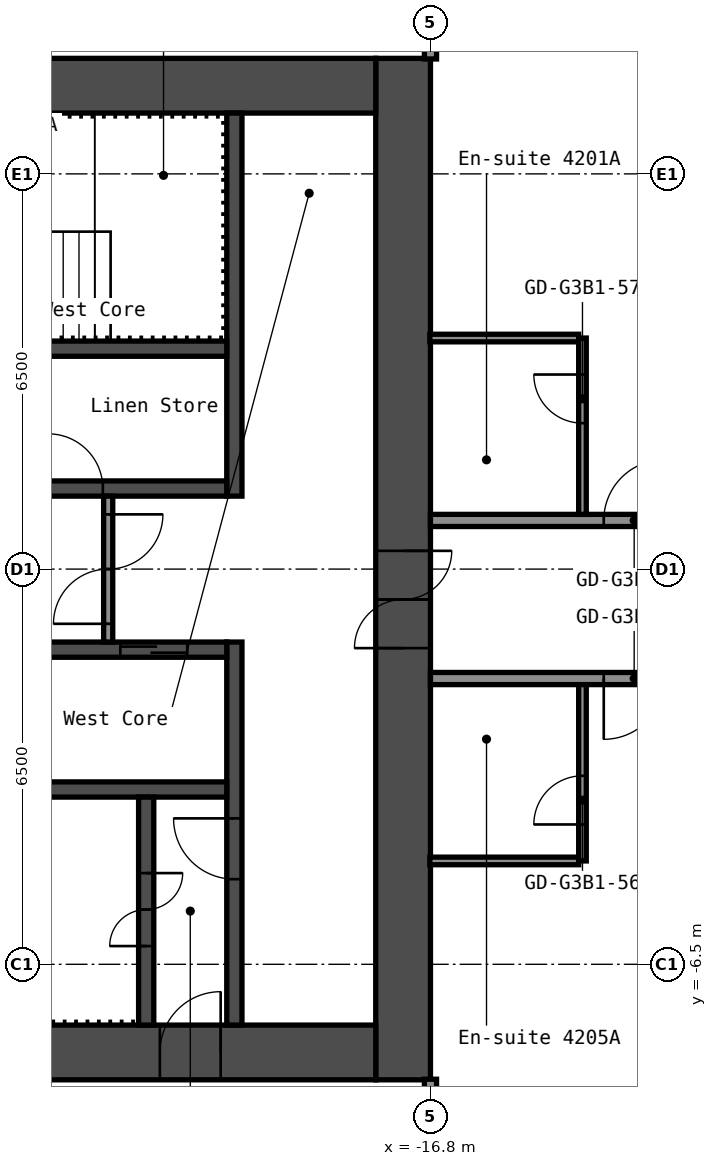
"""IFC4 building model, lengths in metres.
Left out: names, types, materials, properties, quantities, classifications, styles, units other than length and angle.
Written with IfcOpenShell. Run it as: python <this file> out.ifc"""

import sys

from ifc_helpers import new_model, si_unit, direction, frame, frame_2d, origin, place, context, subcontext, project, spatial, rectangle, extrude, element, fill, save


model = new_model("IFC4")
c1 = context("Model", 3, precision=1e-05, world=origin(), true_north=direction((0.0, 1.0)))
c2 = subcontext(c1, "Body", "Model", "MODEL_VIEW")
j1 = project(units=[si_unit("LENGTHUNIT", "METRE"), si_unit("PLANEANGLEUNIT", "RADIAN")], contexts=[c1])
p1 = place(None, origin())
s1 = spatial("IfcSite", under=j1, at=p1, CompositionType="ELEMENT")
p2 = place(p1, origin())
s2 = spatial("IfcBuilding", under=s1, at=p2, CompositionType="ELEMENT")
p3 = place(p2, frame((0.0, 0.0, 150.2)))
s3 = spatial("IfcBuildingStorey", under=s2, at=p3, CompositionType="ELEMENT", Elevation=150.2)
p4 = place(p3, frame((-17.25, -8.4, 0.0), z_axis=(0.0, 0.0, 1.0), x_axis=(0.0, 1.0, 0.0)))
e1 = element("IfcWall", 1, at=p4, inside=s3, PredefinedType="SHEAR", context=c2, shape_type="SweptSolid", body=[
    extrude(rectangle(XDim=16.8, YDim=0.9, at=frame_2d((8.4, 0.0))), origin(), (0.0, 0.0, 1.0), 2.75),
])
p5 = place(p4, frame((7.1, 0.0, 0.0)))
e2 = element("IfcOpeningElement", 2, at=p5, cuts=e1, PredefinedType="OPENING", context=c2, shape_type="SweptSolid", body=[
    extrude(rectangle(XDim=1.6, YDim=2.1, at=frame_2d((0.8, 1.05))), frame((0.0, 0.46, 0.0), z_axis=(0.0, -1.0, 0.0), x_axis=(1.0, 0.0, 0.0)), (0.0, 0.0, 1.0), 0.92),
])
p6 = place(p3, frame((-32.7, 7.95, 0.0), z_axis=(0.0, 0.0, 1.0), x_axis=(1.0, 0.0, 0.0)))
e3 = element("IfcWall", 3, at=p6, inside=s3, PredefinedType="SHEAR", context=c2, shape_type="SweptSolid", body=[
    extrude(rectangle(XDim=15.0, YDim=0.9, at=frame_2d((7.5, 0.0))), origin(), (0.0, 0.0, 1.0), 2.75),
])
p7 = place(p6, frame((3.4, 0.0, 0.0)))
e4 = element("IfcOpeningElement", 4, at=p7, cuts=e3, PredefinedType="OPENING", context=c2, shape_type="SweptSolid", body=[
    extrude(rectangle(XDim=1.2, YDim=2.1, at=frame_2d((0.6, 1.05))), frame((0.0, 0.46, 0.0), z_axis=(0.0, -1.0, 0.0), x_axis=(1.0, 0.0, 0.0)), (0.0, 0.0, 1.0), 0.92),
])
p8 = place(p6, frame((0.75, 0.0, 0.0)))
e5 = element("IfcOpeningElement", 5, at=p8, cuts=e3, PredefinedType="OPENING", context=c2, shape_type="SweptSolid", body=[
    extrude(rectangle(XDim=0.9, YDim=2.1, at=frame_2d((0.45, 1.05))), frame((0.0, 0.46, 0.0), z_axis=(0.0, -1.0, 0.0), x_axis=(1.0, 0.0, 0.0)), (0.0, 0.0, 1.0), 0.92),
])
p9 = place(p3, frame((-32.7, -7.95, 0.0), z_axis=(0.0, 0.0, 1.0), x_axis=(1.0, 0.0, 0.0)))
e6 = element("IfcWall", 6, at=p9, inside=s3, PredefinedType="SHEAR", context=c2, shape_type="SweptSolid", body=[
    extrude(rectangle(XDim=15.0, YDim=0.9, at=frame_2d((7.5, 0.0))), origin(), (0.0, 0.0, 1.0), 2.75),
])
p10 = place(p9, frame((11.45, 0.0, 0.0)))
e7 = element("IfcOpeningElement", 7, at=p10, cuts=e6, PredefinedType="OPENING", context=c2, shape_type="SweptSolid", body=[
    extrude(rectangle(XDim=1.0, YDim=2.1, at=frame_2d((0.5, 1.05))), frame((0.0, 0.46, 0.0), z_axis=(0.0, -1.0, 0.0), x_axis=(1.0, 0.0, 0.0)), (0.0, 0.0, 1.0), 0.92),
])
p11 = place(p3, frame((-20.025, 1.2, 0.0), z_axis=(0.0, 0.0, 1.0), x_axis=(0.0, 1.0, 0.0)))
e8 = element("IfcWall", 8, at=p11, inside=s3, PredefinedType="SHEAR", context=c2, shape_type="SweptSolid", body=[
    extrude(rectangle(XDim=6.3, YDim=0.25, at=frame_2d((3.15, 0.0))), origin(), (0.0, 0.0, 1.0), 2.75),
])
p12 = place(p3, frame((-20.025, -7.5, 0.0), z_axis=(0.0, 0.0, 1.0), x_axis=(0.0, 1.0, 0.0)))
e9 = element("IfcWall", 9, at=p12, inside=s3, PredefinedType="SHEAR", context=c2, shape_type="SweptSolid", body=[
    extrude(rectangle(XDim=6.3, YDim=0.25, at=frame_2d((3.15, 0.0))), origin(), (0.0, 0.0, 1.0), 2.75),
])
p13 = place(p12, frame((2.4, 0.0, 0.0)))
e10 = element("IfcOpeningElement", 10, at=p13, cuts=e9, PredefinedType="OPENING", context=c2, shape_type="SweptSolid", body=[
    extrude(rectangle(XDim=1.0, YDim=2.1, at=frame_2d((0.5, 1.05))), frame((0.0, 0.135, 0.0), z_axis=(0.0, -1.0, 0.0), x_axis=(1.0, 0.0, 0.0)), (0.0, 0.0, 1.0), 0.27),
])
p14 = place(p3, frame((-27.65, 1.325, 0.0), z_axis=(0.0, 0.0, 1.0), x_axis=(1.0, 0.0, 0.0)))
e11 = element("IfcWall", 11, at=p14, inside=s3, PredefinedType="SHEAR", context=c2, shape_type="SweptSolid", body=[
    extrude(rectangle(XDim=7.5, YDim=0.25, at=frame_2d((3.75, 0.0))), origin(), (0.0, 0.0, 1.0), 2.75),
])
p15 = place(p14, frame((4.562, 0.0, 0.0)))
e12 = element("IfcOpeningElement", 12, at=p15, cuts=e11, PredefinedType="OPENING", context=c2, shape_type="SweptSolid", body=[
    extrude(rectangle(XDim=0.9, YDim=2.1, at=frame_2d((0.45, 1.05))), frame((0.0, 0.135, 0.0), z_axis=(0.0, -1.0, 0.0), x_axis=(1.0, 0.0, 0.0)), (0.0, 0.0, 1.0), 0.27),
])
p16 = place(p14, frame((0.863, 0.0, 0.0)))
e13 = element("IfcOpeningElement", 13, at=p16, cuts=e11, PredefinedType="OPENING", context=c2, shape_type="SweptSolid", body=[
    extrude(rectangle(XDim=0.9, YDim=2.1, at=frame_2d((0.45, 1.05))), frame((0.0, 0.135, 0.0), z_axis=(0.0, -1.0, 0.0), x_axis=(1.0, 0.0, 0.0)), (0.0, 0.0, 1.0), 0.27),
])
p17 = place(p3, frame((-27.65, 3.625, 0.0), z_axis=(0.0, 0.0, 1.0), x_axis=(1.0, 0.0, 0.0)))
e14 = element("IfcWall", 14, at=p17, inside=s3, PredefinedType="SHEAR", context=c2, shape_type="SweptSolid", body=[
    extrude(rectangle(XDim=7.5, YDim=0.25, at=frame_2d((3.75, 0.0))), origin(), (0.0, 0.0, 1.0), 2.75),
])
p18 = place(p3, frame((-27.65, -1.325, 0.0), z_axis=(0.0, 0.0, 1.0), x_axis=(1.0, 0.0, 0.0)))
e15 = element("IfcWall", 15, at=p18, inside=s3, PredefinedType="SHEAR", context=c2, shape_type="SweptSolid", body=[
    extrude(rectangle(XDim=7.5, YDim=0.25, at=frame_2d((3.75, 0.0))), origin(), (0.0, 0.0, 1.0), 2.75),
])
p19 = place(p18, frame((5.75, 0.0, 0.0)))
e16 = element("IfcOpeningElement", 16, at=p19, cuts=e15, PredefinedType="OPENING", context=c2, shape_type="SweptSolid", body=[
    extrude(rectangle(XDim=1.1, YDim=2.1, at=frame_2d((0.55, 1.05))), frame((0.0, 0.135, 0.0), z_axis=(0.0, -1.0, 0.0), x_axis=(1.0, 0.0, 0.0)), (0.0, 0.0, 1.0), 0.27),
])
p20 = place(p18, frame((3.35, 0.0, 0.0)))
e17 = element("IfcOpeningElement", 17, at=p20, cuts=e15, PredefinedType="OPENING", context=c2, shape_type="SweptSolid", body=[
    extrude(rectangle(XDim=1.1, YDim=2.1, at=frame_2d((0.55, 1.05))), frame((0.0, 0.135, 0.0), z_axis=(0.0, -1.0, 0.0), x_axis=(1.0, 0.0, 0.0)), (0.0, 0.0, 1.0), 0.27),
])
p21 = place(p18, frame((0.95, 0.0, 0.0)))
e18 = element("IfcOpeningElement", 18, at=p21, cuts=e15, PredefinedType="OPENING", context=c2, shape_type="SweptSolid", body=[
    extrude(rectangle(XDim=1.1, YDim=2.1, at=frame_2d((0.55, 1.05))), frame((0.0, 0.135, 0.0), z_axis=(0.0, -1.0, 0.0), x_axis=(1.0, 0.0, 0.0)), (0.0, 0.0, 1.0), 0.27),
])
p22 = place(p3, frame((-27.65, -3.625, 0.0), z_axis=(0.0, 0.0, 1.0), x_axis=(1.0, 0.0, 0.0)))
e19 = element("IfcWall", 19, at=p22, inside=s3, PredefinedType="SHEAR", context=c2, shape_type="SweptSolid", body=[
    extrude(rectangle(XDim=7.5, YDim=0.25, at=frame_2d((3.75, 0.0))), origin(), (0.0, 0.0, 1.0), 2.75),
])
p23 = place(p3, frame((-21.475, -7.5, 0.0), z_axis=(0.0, 0.0, 1.0), x_axis=(0.0, 1.0, 0.0)))
e20 = element("IfcWall", 20, at=p23, inside=s3, PredefinedType="SHEAR", context=c2, shape_type="SweptSolid", body=[
    extrude(rectangle(XDim=3.75, YDim=0.25, at=frame_2d((1.875, 0.0))), origin(), (0.0, 0.0, 1.0), 2.75),
])
p24 = place(p23, frame((1.3, 0.0, 0.0)))
e21 = element("IfcOpeningElement", 21, at=p24, cuts=e20, PredefinedType="OPENING", context=c2, shape_type="SweptSolid", body=[
    extrude(rectangle(XDim=1.2, YDim=2.1, at=frame_2d((0.6, 1.05))), frame((0.0, 0.135, 0.0), z_axis=(0.0, -1.0, 0.0), x_axis=(1.0, 0.0, 0.0)), (0.0, 0.0, 1.0), 0.27),
])
p25 = place(p3, frame((-22.1, -1.2, 0.0), z_axis=(0.0, 0.0, 1.0), x_axis=(0.0, 1.0, 0.0)))
e22 = element("IfcWall", 22, at=p25, inside=s3, PredefinedType="PARTITIONING", context=c2, shape_type="SweptSolid", body=[
    extrude(rectangle(XDim=2.4, YDim=0.15, at=frame_2d((1.2, 0.0))), origin(), (0.0, 0.0, 1.0), 2.75),
])
p26 = place(p25, frame((0.3, 0.0, 0.0)))
e23 = element("IfcOpeningElement", 23, at=p26, cuts=e22, PredefinedType="OPENING", context=c2, shape_type="SweptSolid", body=[
    extrude(rectangle(XDim=1.8, YDim=2.1, at=frame_2d((0.9, 1.05))), frame((0.0, 0.085, 0.0), z_axis=(0.0, -1.0, 0.0), x_axis=(1.0, 0.0, 0.0)), (0.0, 0.0, 1.0), 0.17),
])
p27 = place(p3, frame((-16.81, -4.8, 0.0), z_axis=(0.0, 0.0, 1.0), x_axis=(1.0, 0.0, 0.0)))
e24 = element("IfcWall", 24, at=p27, inside=s3, PredefinedType="PARTITIONING", context=c2, shape_type="SweptSolid", body=[
    extrude(rectangle(XDim=2.448, YDim=0.125, at=frame_2d((1.224, 0.0))), origin(), (0.0, 0.0, 1.0), 2.75),
])
p28 = place(p3, frame((-16.8, -1.8, 0.0), z_axis=(0.0, 0.0, 1.0), x_axis=(1.0, 0.0, 0.0)))
e25 = element("IfcWall", 25, at=p28, inside=s3, PredefinedType="PARTITIONING", context=c2, shape_type="SweptSolid", body=[
    extrude(rectangle(XDim=33.6, YDim=0.2, at=frame_2d((16.8, 0.0))), origin(), (0.0, 0.0, 1.0), 2.75),
])
p29 = place(p28, frame((2.85, 0.0, 0.0)))
e26 = element("IfcOpeningElement", 26, at=p29, cuts=e25, PredefinedType="OPENING", context=c2, shape_type="SweptSolid", body=[
    extrude(rectangle(XDim=1.0, YDim=2.1, at=frame_2d((0.5, 1.05))), frame((0.0, 0.11, 0.0), z_axis=(0.0, -1.0, 0.0), x_axis=(1.0, 0.0, 0.0)), (0.0, 0.0, 1.0), 0.22),
])
p30 = place(p28, frame((4.55, 0.0, 0.0)))
e27 = element("IfcOpeningElement", 27, at=p30, cuts=e25, PredefinedType="OPENING", context=c2, shape_type="SweptSolid", body=[
    extrude(rectangle(XDim=1.0, YDim=2.1, at=frame_2d((0.5, 1.05))), frame((0.0, 0.11, 0.0), z_axis=(0.0, -1.0, 0.0), x_axis=(1.0, 0.0, 0.0)), (0.0, 0.0, 1.0), 0.22),
])
p31 = place(p28, frame((10.3, 0.0, 0.0)))
e28 = element("IfcOpeningElement", 28, at=p31, cuts=e25, PredefinedType="OPENING", context=c2, shape_type="SweptSolid", body=[
    extrude(rectangle(XDim=1.0, YDim=2.1, at=frame_2d((0.5, 1.05))), frame((0.0, 0.11, 0.0), z_axis=(0.0, -1.0, 0.0), x_axis=(1.0, 0.0, 0.0)), (0.0, 0.0, 1.0), 0.22),
])
p32 = place(p28, frame((20.5, 0.0, 0.0)))
e29 = element("IfcOpeningElement", 29, at=p32, cuts=e25, PredefinedType="OPENING", context=c2, shape_type="SweptSolid", body=[
    extrude(rectangle(XDim=1.0, YDim=2.1, at=frame_2d((0.5, 1.05))), frame((0.0, 0.11, 0.0), z_axis=(0.0, -1.0, 0.0), x_axis=(1.0, 0.0, 0.0)), (0.0, 0.0, 1.0), 0.22),
])
p33 = place(p28, frame((28.05, 0.0, 0.0)))
e30 = element("IfcOpeningElement", 30, at=p33, cuts=e25, PredefinedType="OPENING", context=c2, shape_type="SweptSolid", body=[
    extrude(rectangle(XDim=1.0, YDim=2.1, at=frame_2d((0.5, 1.05))), frame((0.0, 0.11, 0.0), z_axis=(0.0, -1.0, 0.0), x_axis=(1.0, 0.0, 0.0)), (0.0, 0.0, 1.0), 0.22),
])
p34 = place(p28, frame((29.75, 0.0, 0.0)))
e31 = element("IfcOpeningElement", 31, at=p34, cuts=e25, PredefinedType="OPENING", context=c2, shape_type="SweptSolid", body=[
    extrude(rectangle(XDim=1.0, YDim=2.1, at=frame_2d((0.5, 1.05))), frame((0.0, 0.11, 0.0), z_axis=(0.0, -1.0, 0.0), x_axis=(1.0, 0.0, 0.0)), (0.0, 0.0, 1.0), 0.22),
])
p35 = place(p3, frame((-16.8, 0.8, 0.0), z_axis=(0.0, 0.0, 1.0), x_axis=(1.0, 0.0, 0.0)))
e32 = element("IfcWall", 32, at=p35, inside=s3, PredefinedType="PARTITIONING", context=c2, shape_type="SweptSolid", body=[
    extrude(rectangle(XDim=33.6, YDim=0.2, at=frame_2d((16.8, 0.0))), origin(), (0.0, 0.0, 1.0), 2.75),
])
p36 = place(p35, frame((2.85, 0.0, 0.0)))
e33 = element("IfcOpeningElement", 33, at=p36, cuts=e32, PredefinedType="OPENING", context=c2, shape_type="SweptSolid", body=[
    extrude(rectangle(XDim=1.0, YDim=2.1, at=frame_2d((0.5, 1.05))), frame((0.0, 0.11, 0.0), z_axis=(0.0, -1.0, 0.0), x_axis=(1.0, 0.0, 0.0)), (0.0, 0.0, 1.0), 0.22),
])
p37 = place(p35, frame((4.55, 0.0, 0.0)))
e34 = element("IfcOpeningElement", 34, at=p37, cuts=e32, PredefinedType="OPENING", context=c2, shape_type="SweptSolid", body=[
    extrude(rectangle(XDim=1.0, YDim=2.1, at=frame_2d((0.5, 1.05))), frame((0.0, 0.11, 0.0), z_axis=(0.0, -1.0, 0.0), x_axis=(1.0, 0.0, 0.0)), (0.0, 0.0, 1.0), 0.22),
])
p38 = place(p35, frame((10.22, 0.0, 0.0)))
e35 = element("IfcOpeningElement", 35, at=p38, cuts=e32, PredefinedType="OPENING", context=c2, shape_type="SweptSolid", body=[
    extrude(rectangle(XDim=0.9, YDim=2.1, at=frame_2d((0.45, 1.05))), frame((0.0, 0.11, 0.0), z_axis=(0.0, -1.0, 0.0), x_axis=(1.0, 0.0, 0.0)), (0.0, 0.0, 1.0), 0.22),
])
p39 = place(p35, frame((14.42, 0.0, 0.0)))
e36 = element("IfcOpeningElement", 36, at=p39, cuts=e32, PredefinedType="OPENING", context=c2, shape_type="SweptSolid", body=[
    extrude(rectangle(XDim=0.9, YDim=2.1, at=frame_2d((0.45, 1.05))), frame((0.0, 0.11, 0.0), z_axis=(0.0, -1.0, 0.0), x_axis=(1.0, 0.0, 0.0)), (0.0, 0.0, 1.0), 0.22),
])
p40 = place(p35, frame((19.65, 0.0, 0.0)))
e37 = element("IfcOpeningElement", 37, at=p40, cuts=e32, PredefinedType="OPENING", context=c2, shape_type="SweptSolid", body=[
    extrude(rectangle(XDim=1.0, YDim=2.1, at=frame_2d((0.5, 1.05))), frame((0.0, 0.11, 0.0), z_axis=(0.0, -1.0, 0.0), x_axis=(1.0, 0.0, 0.0)), (0.0, 0.0, 1.0), 0.22),
])
p41 = place(p35, frame((21.35, 0.0, 0.0)))
e38 = element("IfcOpeningElement", 38, at=p41, cuts=e32, PredefinedType="OPENING", context=c2, shape_type="SweptSolid", body=[
    extrude(rectangle(XDim=1.0, YDim=2.1, at=frame_2d((0.5, 1.05))), frame((0.0, 0.11, 0.0), z_axis=(0.0, -1.0, 0.0), x_axis=(1.0, 0.0, 0.0)), (0.0, 0.0, 1.0), 0.22),
])
p42 = place(p35, frame((28.05, 0.0, 0.0)))
e39 = element("IfcOpeningElement", 39, at=p42, cuts=e32, PredefinedType="OPENING", context=c2, shape_type="SweptSolid", body=[
    extrude(rectangle(XDim=1.0, YDim=2.1, at=frame_2d((0.5, 1.05))), frame((0.0, 0.11, 0.0), z_axis=(0.0, -1.0, 0.0), x_axis=(1.0, 0.0, 0.0)), (0.0, 0.0, 1.0), 0.22),
])
p43 = place(p35, frame((29.75, 0.0, 0.0)))
e40 = element("IfcOpeningElement", 40, at=p43, cuts=e32, PredefinedType="OPENING", context=c2, shape_type="SweptSolid", body=[
    extrude(rectangle(XDim=1.0, YDim=2.1, at=frame_2d((0.5, 1.05))), frame((0.0, 0.11, 0.0), z_axis=(0.0, -1.0, 0.0), x_axis=(1.0, 0.0, 0.0)), (0.0, 0.0, 1.0), 0.22),
])
p44 = place(p3, frame((-16.81, 3.8, 0.0), z_axis=(0.0, 0.0, 1.0), x_axis=(1.0, 0.0, 0.0)))
e41 = element("IfcWall", 41, at=p44, inside=s3, PredefinedType="PARTITIONING", context=c2, shape_type="SweptSolid", body=[
    extrude(rectangle(XDim=2.448, YDim=0.125, at=frame_2d((1.224, 0.0))), origin(), (0.0, 0.0, 1.0), 2.75),
])
p45 = place(p3, frame((-16.8, -19.3, 0.0), z_axis=(0.0, 0.0, 1.0), x_axis=(0.0, 1.0, 0.0)))
e42 = element("IfcWall", 42, at=p45, inside=s3, PredefinedType="PARTITIONING", context=c2, shape_type="SweptSolid", body=[
    extrude(rectangle(XDim=10.91, YDim=0.2, at=frame_2d((5.455, 0.0))), origin(), (0.0, 0.0, 1.0), 2.75),
])
p46 = place(p3, frame((-16.8, 8.39, 0.0), z_axis=(0.0, 0.0, 1.0), x_axis=(0.0, 1.0, 0.0)))
e43 = element("IfcWall", 43, at=p46, inside=s3, PredefinedType="PARTITIONING", context=c2, shape_type="SweptSolid", body=[
    extrude(rectangle(XDim=9.91, YDim=0.2, at=frame_2d((4.955, 0.0))), origin(), (0.0, 0.0, 1.0), 2.75),
])
p47 = place(p3, frame((-14.3, -4.8, 0.0), z_axis=(0.0, 0.0, 1.0), x_axis=(0.0, 1.0, 0.0)))
e44 = element("IfcWall", 44, at=p47, inside=s3, PredefinedType="PARTITIONING", context=c2, shape_type="SweptSolid", body=[
    extrude(rectangle(XDim=2.9, YDim=0.125, at=frame_2d((1.45, 0.0))), origin(), (0.0, 0.0, 1.0), 2.75),
])
p48 = place(p47, frame((0.6, 0.0, 0.0)))
e45 = element("IfcOpeningElement", 45, at=p48, cuts=e44, PredefinedType="OPENING", context=c2, shape_type="SweptSolid", body=[
    extrude(rectangle(XDim=0.8, YDim=2.1, at=frame_2d((0.4, 1.05))), frame((0.0, 0.073, 0.0), z_axis=(0.0, -1.0, 0.0), x_axis=(1.0, 0.0, 0.0)), (0.0, 0.0, 1.0), 0.145),
])
p49 = place(p3, frame((-14.3, 0.9, 0.0), z_axis=(0.0, 0.0, 1.0), x_axis=(0.0, 1.0, 0.0)))
e46 = element("IfcWall", 46, at=p49, inside=s3, PredefinedType="PARTITIONING", context=c2, shape_type="SweptSolid", body=[
    extrude(rectangle(XDim=2.9, YDim=0.125, at=frame_2d((1.45, 0.0))), origin(), (0.0, 0.0, 1.0), 2.75),
])
p50 = place(p49, frame((1.5, 0.0, 0.0)))
e47 = element("IfcOpeningElement", 47, at=p50, cuts=e46, PredefinedType="OPENING", context=c2, shape_type="SweptSolid", body=[
    extrude(rectangle(XDim=0.8, YDim=2.1, at=frame_2d((0.4, 1.05))), frame((0.0, 0.073, 0.0), z_axis=(0.0, -1.0, 0.0), x_axis=(1.0, 0.0, 0.0)), (0.0, 0.0, 1.0), 0.145),
])
p51 = place(p5, origin())
e48 = element("IfcDoor", 48, at=p51, inside=s3, OperationType="DOUBLE_DOOR_SINGLE_SWING", PredefinedType="DOOR", context=c2, shape_type="SweptSolid", body=[
    extrude(rectangle(XDim=1.6, YDim=2.1, at=frame_2d((0.8, 1.05))), frame((0.0, 0.025, 0.0), z_axis=(0.0, -1.0, 0.0), x_axis=(1.0, 0.0, 0.0)), (0.0, 0.0, 1.0), 0.05),
])
fill(e2, e48)
p52 = place(p10, origin())
e49 = element("IfcDoor", 49, at=p52, inside=s3, OperationType="SINGLE_SWING_LEFT", PredefinedType="DOOR", context=c2, shape_type="SweptSolid", body=[
    extrude(rectangle(XDim=1.0, YDim=2.1, at=frame_2d((0.5, 1.05))), frame((0.0, 0.025, 0.0), z_axis=(0.0, -1.0, 0.0), x_axis=(1.0, 0.0, 0.0)), (0.0, 0.0, 1.0), 0.05),
])
fill(e7, e49)
p53 = place(p24, origin())
e50 = element("IfcDoor", 50, at=p53, inside=s3, OperationType="DOUBLE_DOOR_SINGLE_SWING", PredefinedType="DOOR", context=c2, shape_type="SweptSolid", body=[
    extrude(rectangle(XDim=1.2, YDim=2.1, at=frame_2d((0.6, 1.05))), frame((0.0, 0.025, 0.0), z_axis=(0.0, -1.0, 0.0), x_axis=(1.0, 0.0, 0.0)), (0.0, 0.0, 1.0), 0.05),
])
fill(e21, e50)
p54 = place(p13, origin())
e51 = element("IfcDoor", 51, at=p54, inside=s3, OperationType="SINGLE_SWING_LEFT", PredefinedType="DOOR", context=c2, shape_type="SweptSolid", body=[
    extrude(rectangle(XDim=1.0, YDim=2.1, at=frame_2d((0.5, 1.05))), frame((0.0, 0.025, 0.0), z_axis=(0.0, -1.0, 0.0), x_axis=(1.0, 0.0, 0.0)), (0.0, 0.0, 1.0), 0.05),
])
fill(e10, e51)
p55 = place(p26, origin())
e52 = element("IfcDoor", 52, at=p55, inside=s3, OperationType="DOUBLE_DOOR_SINGLE_SWING", PredefinedType="DOOR", context=c2, shape_type="SweptSolid", body=[
    extrude(rectangle(XDim=1.8, YDim=2.1, at=frame_2d((0.9, 1.05))), frame((0.0, 0.025, 0.0), z_axis=(0.0, -1.0, 0.0), x_axis=(1.0, 0.0, 0.0)), (0.0, 0.0, 1.0), 0.05),
])
fill(e23, e52)
p56 = place(p15, origin())
e53 = element("IfcDoor", 53, at=p56, inside=s3, OperationType="SINGLE_SWING_RIGHT", PredefinedType="DOOR", context=c2, shape_type="SweptSolid", body=[
    extrude(rectangle(XDim=0.9, YDim=2.1, at=frame_2d((0.45, 1.05))), frame((0.0, 0.025, 0.0), z_axis=(0.0, -1.0, 0.0), x_axis=(1.0, 0.0, 0.0)), (0.0, 0.0, 1.0), 0.05),
])
fill(e12, e53)
p57 = place(p19, origin())
e54 = element("IfcDoor", 54, at=p57, inside=s3, OperationType="DOUBLE_DOOR_SLIDING", PredefinedType="DOOR", context=c2, shape_type="SweptSolid", body=[
    extrude(rectangle(XDim=1.1, YDim=2.1, at=frame_2d((0.55, 1.05))), frame((0.0, 0.025, 0.0), z_axis=(0.0, -1.0, 0.0), x_axis=(1.0, 0.0, 0.0)), (0.0, 0.0, 1.0), 0.05),
])
fill(e16, e54)
p58 = place(p29, origin())
e55 = element("IfcDoor", 55, at=p58, inside=s3, OperationType="SINGLE_SWING_LEFT", PredefinedType="DOOR", context=c2, shape_type="SweptSolid", body=[
    extrude(rectangle(XDim=1.0, YDim=2.1, at=frame_2d((0.5, 1.05))), frame((0.0, 0.025, 0.0), z_axis=(0.0, -1.0, 0.0), x_axis=(1.0, 0.0, 0.0)), (0.0, 0.0, 1.0), 0.05),
])
fill(e26, e55)
p59 = place(p36, origin())
e56 = element("IfcDoor", 56, at=p59, inside=s3, OperationType="SINGLE_SWING_LEFT", PredefinedType="DOOR", context=c2, shape_type="SweptSolid", body=[
    extrude(rectangle(XDim=1.0, YDim=2.1, at=frame_2d((0.5, 1.05))), frame((0.0, 0.025, 0.0), z_axis=(0.0, -1.0, 0.0), x_axis=(1.0, 0.0, 0.0)), (0.0, 0.0, 1.0), 0.05),
])
fill(e33, e56)
p60 = place(p48, origin())
e57 = element("IfcDoor", 57, at=p60, inside=s3, OperationType="SINGLE_SWING_RIGHT", PredefinedType="DOOR", context=c2, shape_type="SweptSolid", body=[
    extrude(rectangle(XDim=0.8, YDim=2.1, at=frame_2d((0.4, 1.05))), frame((0.0, 0.025, 0.0), z_axis=(0.0, -1.0, 0.0), x_axis=(1.0, 0.0, 0.0)), (0.0, 0.0, 1.0), 0.05),
])
fill(e45, e57)
p61 = place(p50, origin())
e58 = element("IfcDoor", 58, at=p61, inside=s3, OperationType="SINGLE_SWING_LEFT", PredefinedType="DOOR", context=c2, shape_type="SweptSolid", body=[
    extrude(rectangle(XDim=0.8, YDim=2.1, at=frame_2d((0.4, 1.05))), frame((0.0, 0.025, 0.0), z_axis=(0.0, -1.0, 0.0), x_axis=(1.0, 0.0, 0.0)), (0.0, 0.0, 1.0), 0.05),
])
fill(e47, e58)
save(model, sys.argv[1])
